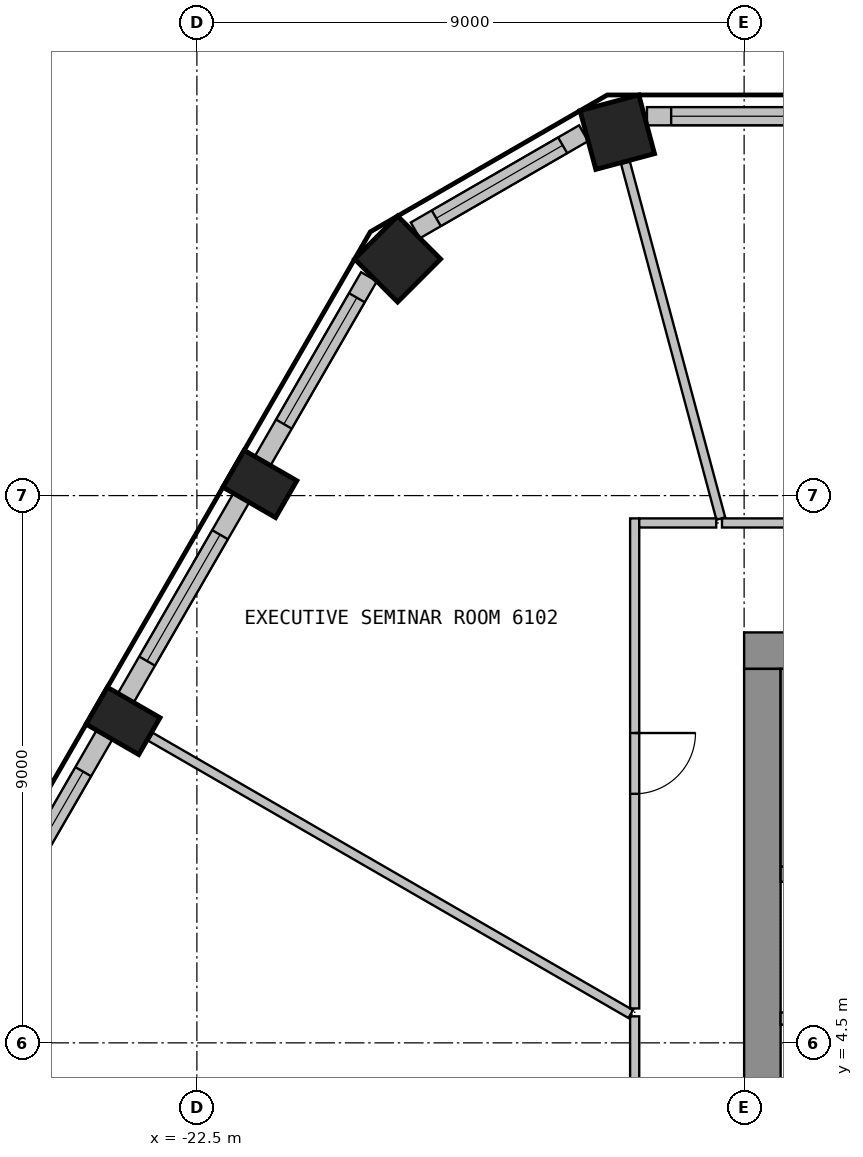
"""IFC4 building model, lengths in metres.
Left out: names, types, materials, properties, quantities, classifications, styles, units other than length and angle.
Written with IfcOpenShell. Run it as: python <this file> out.ifc"""

import sys

from ifc_helpers import new_model, si_unit, direction, frame, frame_2d, origin, origin_2d, place, context, subcontext, project, spatial, rectangle, extrude, element, fill, save


model = new_model("IFC4")
c1 = context("Model", 3, precision=1e-05, world=origin(), true_north=direction((0.0, 1.0)))
c2 = subcontext(c1, "Body", "Model", "MODEL_VIEW")
j1 = project(units=[si_unit("LENGTHUNIT", "METRE"), si_unit("PLANEANGLEUNIT", "RADIAN")], contexts=[c1])
p1 = place(None, origin())
s1 = spatial("IfcSite", under=j1, at=p1, CompositionType="ELEMENT")
p2 = place(p1, origin())
s2 = spatial("IfcBuilding", under=s1, at=p2, CompositionType="ELEMENT")
p3 = place(p2, frame((0.0, 0.0, 246.9)))
s3 = spatial("IfcBuildingStorey", under=s2, at=p3, CompositionType="ELEMENT", Elevation=246.9)
for number, where, z_axis, x_axis in (
    (1, (-15.586, 19.476, 0.0), (0.0, 0.0, 1.0), (-0.966, -0.259, 0.0)),
    (2, (-19.199, 17.39, 0.0), (0.0, 0.0, 1.0), (-0.707, -0.707, 0.0)),
):
    element("IfcColumn", number, at=place(p3, frame(where, z_axis=z_axis, x_axis=x_axis)), inside=s3, PredefinedType="COLUMN", context=c2, shape_type="SweptSolid", body=[
        extrude(rectangle(XDim=1.0, YDim=1.0, at=origin_2d()), origin(), (0.0, 0.0, 1.0), 3.575),
    ])
for number, where, z_axis, x_axis in (
    (3, (-21.464, 13.691, 0.0), (0.0, 0.0, 1.0), (-0.5, -0.866, 0.0)),
    (4, (-23.714, 9.794, 0.0), (0.0, 0.0, 1.0), (-0.5, -0.866, 0.0)),
):
    element("IfcColumn", number, at=place(p3, frame(where, z_axis=z_axis, x_axis=x_axis)), inside=s3, PredefinedType="COLUMN", context=c2, shape_type="SweptSolid", body=[
        extrude(rectangle(XDim=0.7, YDim=1.0, at=origin_2d()), origin(), (0.0, 0.0, 1.0), 3.575),
    ])
p4 = place(p3, frame((-11.601, 19.739, 0.0), z_axis=(0.0, 0.0, 1.0), x_axis=(-1.0, 0.0, 0.0)))
e5 = element("IfcWall", 5, at=p4, inside=s3, PredefinedType="SOLIDWALL", context=c2, shape_type="SweptSolid", body=[
    extrude(rectangle(XDim=3.498, YDim=0.3, at=frame_2d((1.749, 0.0))), origin(), (0.0, 0.0, 1.0), 3.575),
])
p5 = place(p4, frame((0.699, 0.0, 0.9)))
e6 = element("IfcOpeningElement", 6, at=p5, cuts=e5, PredefinedType="OPENING", context=c2, shape_type="SweptSolid", body=[
    extrude(rectangle(XDim=2.4, YDim=2.1, at=frame_2d((1.2, 1.05))), frame((0.0, 0.16, 0.0), z_axis=(0.0, -1.0, 0.0), x_axis=(1.0, 0.0, 0.0)), (0.0, 0.0, 1.0), 0.32),
])
p6 = place(p3, frame((-16.14, 19.459, 0.0), z_axis=(0.0, 0.0, 1.0), x_axis=(-0.866025316205, -0.500000151692, 0.0)))
e7 = element("IfcWall", 7, at=p6, inside=s3, PredefinedType="SOLIDWALL", context=c2, shape_type="SweptSolid", body=[
    extrude(rectangle(XDim=3.196, YDim=0.3, at=frame_2d((1.598, 0.0))), origin(), (0.0, 0.0, 1.0), 3.575),
])
p7 = place(p6, frame((0.398, 0.0, 0.9)))
e8 = element("IfcOpeningElement", 8, at=p7, cuts=e7, PredefinedType="OPENING", context=c2, shape_type="SweptSolid", body=[
    extrude(rectangle(XDim=2.4, YDim=2.1, at=frame_2d((1.2, 1.05))), frame((0.0, 0.16, 0.0), z_axis=(0.0, -1.0, 0.0), x_axis=(1.0, 0.0, 0.0)), (0.0, 0.0, 1.0), 0.32),
])
p8 = place(p3, frame((-19.67, 17.099, 0.0), z_axis=(0.0, 0.0, 1.0), x_axis=(-0.499960102815, -0.866048437209, 0.0)))
e9 = element("IfcWall", 9, at=p8, inside=s3, PredefinedType="SOLIDWALL", context=c2, shape_type="SweptSolid", body=[
    extrude(rectangle(XDim=3.498, YDim=0.3, at=frame_2d((1.749, 0.0))), origin(), (0.0, 0.0, 1.0), 3.575),
])
p9 = place(p8, frame((0.398, 0.0, 0.9)))
e10 = element("IfcOpeningElement", 10, at=p9, cuts=e9, PredefinedType="OPENING", context=c2, shape_type="SweptSolid", body=[
    extrude(rectangle(XDim=2.4, YDim=2.1, at=frame_2d((1.2, 1.05))), frame((0.0, 0.16, 0.0), z_axis=(0.0, -1.0, 0.0), x_axis=(1.0, 0.0, 0.0)), (0.0, 0.0, 1.0), 0.32),
])
p10 = place(p3, frame((-21.769, 13.463, 0.0), z_axis=(0.0, 0.0, 1.0), x_axis=(-0.499982058975, -0.866035761792, 0.0)))
e11 = element("IfcWall", 11, at=p10, inside=s3, PredefinedType="SOLIDWALL", context=c2, shape_type="SweptSolid", body=[
    extrude(rectangle(XDim=3.799, YDim=0.3, at=frame_2d((1.899, 0.0))), origin(), (0.0, 0.0, 1.0), 3.575),
])
p11 = place(p10, frame((0.699, 0.0, 0.9)))
e12 = element("IfcOpeningElement", 12, at=p11, cuts=e11, PredefinedType="OPENING", context=c2, shape_type="SweptSolid", body=[
    extrude(rectangle(XDim=2.4, YDim=2.1, at=frame_2d((1.2, 1.05))), frame((0.0, 0.16, 0.0), z_axis=(0.0, -1.0, 0.0), x_axis=(1.0, 0.0, 0.0)), (0.0, 0.0, 1.0), 0.32),
])
p12 = place(p3, frame((-24.019, 9.566, 0.0), z_axis=(0.0, 0.0, 1.0), x_axis=(-0.499982058975, -0.866035761792, 0.0)))
e13 = element("IfcWall", 13, at=p12, inside=s3, PredefinedType="SOLIDWALL", context=c2, shape_type="SweptSolid", body=[
    extrude(rectangle(XDim=3.799, YDim=0.3, at=frame_2d((1.899, 0.0))), origin(), (0.0, 0.0, 1.0), 3.575),
])
p13 = place(p12, frame((0.699, 0.0, 0.9)))
e14 = element("IfcOpeningElement", 14, at=p13, cuts=e13, PredefinedType="OPENING", context=c2, shape_type="SweptSolid", body=[
    extrude(rectangle(XDim=2.4, YDim=2.1, at=frame_2d((1.2, 1.05))), frame((0.0, 0.16, 0.0), z_axis=(0.0, -1.0, 0.0), x_axis=(1.0, 0.0, 0.0)), (0.0, 0.0, 1.0), 0.32),
])
p14 = place(p3, frame((-13.5, 10.95, 0.0), z_axis=(0.0, 0.0, 1.0), x_axis=(1.0, 0.0, 0.0)))
e15 = element("IfcWall", 15, at=p14, inside=s3, PredefinedType="SHEAR", context=c2, shape_type="SweptSolid", body=[
    extrude(rectangle(XDim=27.0, YDim=0.6, at=frame_2d((13.5, 0.0))), origin(), (0.0, 0.0, 1.0), 3.575),
])
p15 = place(p14, frame((12.3, 0.0, 0.0)))
e16 = element("IfcOpeningElement", 16, at=p15, cuts=e15, PredefinedType="OPENING", context=c2, shape_type="SweptSolid", body=[
    extrude(rectangle(XDim=2.4, YDim=2.1, at=frame_2d((1.2, 1.05))), frame((0.0, 0.31, 0.0), z_axis=(0.0, -1.0, 0.0), x_axis=(1.0, 0.0, 0.0)), (0.0, 0.0, 1.0), 0.62),
])
p16 = place(p14, frame((1.05, 0.0, 0.0)))
e17 = element("IfcOpeningElement", 17, at=p16, cuts=e15, PredefinedType="OPENING", context=c2, shape_type="SweptSolid", body=[
    extrude(rectangle(XDim=1.2, YDim=2.1, at=frame_2d((0.6, 1.05))), frame((0.0, 0.31, 0.0), z_axis=(0.0, -1.0, 0.0), x_axis=(1.0, 0.0, 0.0)), (0.0, 0.0, 1.0), 0.62),
])
p17 = place(p14, frame((24.75, 0.0, 0.0)))
e18 = element("IfcOpeningElement", 18, at=p17, cuts=e15, PredefinedType="OPENING", context=c2, shape_type="SweptSolid", body=[
    extrude(rectangle(XDim=1.2, YDim=2.1, at=frame_2d((0.6, 1.05))), frame((0.0, 0.31, 0.0), z_axis=(0.0, -1.0, 0.0), x_axis=(1.0, 0.0, 0.0)), (0.0, 0.0, 1.0), 0.62),
])
p18 = place(p3, frame((-13.2, -10.65, 0.0), z_axis=(0.0, 0.0, 1.0), x_axis=(0.0, 1.0, 0.0)))
e19 = element("IfcWall", 19, at=p18, inside=s3, PredefinedType="SHEAR", context=c2, shape_type="SweptSolid", body=[
    extrude(rectangle(XDim=21.3, YDim=0.6, at=frame_2d((10.65, 0.0))), origin(), (0.0, 0.0, 1.0), 3.575),
])
p19 = place(p18, frame((9.45, 0.0, 0.0)))
e20 = element("IfcOpeningElement", 20, at=p19, cuts=e19, PredefinedType="OPENING", context=c2, shape_type="SweptSolid", body=[
    extrude(rectangle(XDim=2.4, YDim=2.1, at=frame_2d((1.2, 1.05))), frame((0.0, 0.31, 0.0), z_axis=(0.0, -1.0, 0.0), x_axis=(1.0, 0.0, 0.0)), (0.0, 0.0, 1.0), 0.62),
])
p20 = place(p3, frame((-12.9, 7.275, 0.0), z_axis=(0.0, 0.0, 1.0), x_axis=(1.0, 0.0, 0.0)))
e21 = element("IfcWall", 21, at=p20, inside=s3, PredefinedType="SHEAR", context=c2, shape_type="SweptSolid", body=[
    extrude(rectangle(XDim=10.1, YDim=0.25, at=frame_2d((5.05, 0.0))), origin(), (0.0, 0.0, 1.0), 3.575),
])
p21 = place(p20, frame((0.45, 0.0, 0.0)))
e22 = element("IfcOpeningElement", 22, at=p21, cuts=e21, PredefinedType="OPENING", context=c2, shape_type="SweptSolid", body=[
    extrude(rectangle(XDim=1.2, YDim=2.1, at=frame_2d((0.6, 1.05))), frame((0.0, 0.135, 0.0), z_axis=(0.0, -1.0, 0.0), x_axis=(1.0, 0.0, 0.0)), (0.0, 0.0, 1.0), 0.27),
])
p22 = place(p3, frame((-12.775, 7.4, 0.0), z_axis=(0.0, 0.0, 1.0), x_axis=(0.0, 1.0, 0.0)))
e23 = element("IfcWall", 23, at=p22, inside=s3, PredefinedType="SHEAR", context=c2, shape_type="SweptSolid", body=[
    extrude(rectangle(XDim=3.25, YDim=0.25, at=frame_2d((1.625, 0.0))), origin(), (0.0, 0.0, 1.0), 3.575),
])
p23 = place(p3, frame((-12.9, 4.9, 0.0), z_axis=(0.0, 0.0, 1.0), x_axis=(1.0, 0.0, 0.0)))
e24 = element("IfcWall", 24, at=p23, inside=s3, PredefinedType="PARTITIONING", context=c2, shape_type="SweptSolid", body=[
    extrude(rectangle(XDim=11.375, YDim=0.2, at=frame_2d((5.688, 0.0))), origin(), (0.0, 0.0, 1.0), 3.575),
])
p24 = place(p3, frame((-23.264, 9.534, 0.0), z_axis=(0.0, 0.0, 1.0), x_axis=(0.866009068046, -0.500028293261, 0.0)))
e25 = element("IfcWall", 25, at=p24, inside=s3, PredefinedType="PARTITIONING", context=c2, shape_type="SweptSolid", body=[
    extrude(rectangle(XDim=9.121, YDim=0.15, at=frame_2d((4.561, 0.0))), origin(), (0.0, 0.0, 1.0), 3.575),
])
p25 = place(p3, frame((-15.452, 18.974, 0.0), z_axis=(0.0, 0.0, 1.0), x_axis=(0.258896568031, -0.965905050749, 0.0)))
e26 = element("IfcWall", 26, at=p25, inside=s3, PredefinedType="PARTITIONING", context=c2, shape_type="SweptSolid", body=[
    extrude(rectangle(XDim=6.058, YDim=0.15, at=frame_2d((3.029, 0.0))), origin(), (0.0, 0.0, 1.0), 3.575),
])
p26 = place(p3, frame((-15.3, 4.936, 0.0), z_axis=(0.0, 0.0, 1.0), x_axis=(0.0, -1.0, 0.0)))
e27 = element("IfcWall", 27, at=p26, inside=s3, PredefinedType="PARTITIONING", context=c2, shape_type="SweptSolid", body=[
    extrude(rectangle(XDim=6.167, YDim=0.15, at=frame_2d((3.083, 0.0))), origin(), (0.0, 0.0, 1.0), 3.575),
])
p27 = place(p26, frame((2.583, 0.0, 0.0)))
e28 = element("IfcOpeningElement", 28, at=p27, cuts=e27, PredefinedType="OPENING", context=c2, shape_type="SweptSolid", body=[
    extrude(rectangle(XDim=1.0, YDim=2.1, at=frame_2d((0.5, 1.05))), frame((0.0, 0.085, 0.0), z_axis=(0.0, -1.0, 0.0), x_axis=(1.0, 0.0, 0.0)), (0.0, 0.0, 1.0), 0.17),
])
p28 = place(p3, frame((-15.3, 13.125, 0.0), z_axis=(0.0, 0.0, 1.0), x_axis=(0.0, -1.0, 0.0)))
e29 = element("IfcWall", 29, at=p28, inside=s3, PredefinedType="PARTITIONING", context=c2, shape_type="SweptSolid", body=[
    extrude(rectangle(XDim=8.059, YDim=0.15, at=frame_2d((4.03, 0.0))), origin(), (0.0, 0.0, 1.0), 3.575),
])
p29 = place(p28, frame((3.53, 0.0, 0.0)))
e30 = element("IfcOpeningElement", 30, at=p29, cuts=e29, PredefinedType="OPENING", context=c2, shape_type="SweptSolid", body=[
    extrude(rectangle(XDim=1.0, YDim=2.1, at=frame_2d((0.5, 1.05))), frame((0.0, 0.085, 0.0), z_axis=(0.0, -1.0, 0.0), x_axis=(1.0, 0.0, 0.0)), (0.0, 0.0, 1.0), 0.17),
])
p30 = place(p3, frame((-13.959, 13.05, 0.0), z_axis=(0.0, 0.0, 1.0), x_axis=(-1.0, 0.0, 0.0)))
e31 = element("IfcWall", 31, at=p30, inside=s3, PredefinedType="PARTITIONING", context=c2, shape_type="SweptSolid", body=[
    extrude(rectangle(XDim=1.266, YDim=0.15, at=frame_2d((0.633, 0.0))), origin(), (0.0, 0.0, 1.0), 3.575),
])
p31 = place(p3, frame((-6.75, 13.05, 0.0), z_axis=(0.0, 0.0, 1.0), x_axis=(-1.0, 0.0, 0.0)))
e32 = element("IfcWall", 32, at=p31, inside=s3, PredefinedType="PARTITIONING", context=c2, shape_type="SweptSolid", body=[
    extrude(rectangle(XDim=7.114, YDim=0.15, at=frame_2d((3.557, 0.0))), origin(), (0.0, 0.0, 1.0), 3.575),
])
p32 = place(p31, frame((3.057, 0.0, 0.0)))
e33 = element("IfcOpeningElement", 33, at=p32, cuts=e32, PredefinedType="OPENING", context=c2, shape_type="SweptSolid", body=[
    extrude(rectangle(XDim=1.0, YDim=2.1, at=frame_2d((0.5, 1.05))), frame((0.0, 0.085, 0.0), z_axis=(0.0, -1.0, 0.0), x_axis=(1.0, 0.0, 0.0)), (0.0, 0.0, 1.0), 0.17),
])
p33 = place(p5, origin())
e34 = element("IfcWindow", 34, at=p33, inside=s3, PartitioningType="SINGLE_PANEL", PredefinedType="WINDOW", context=c2, shape_type="SweptSolid", body=[
    extrude(rectangle(XDim=2.4, YDim=2.1, at=frame_2d((1.2, 1.05))), frame((0.0, 0.03, 0.0), z_axis=(0.0, -1.0, 0.0), x_axis=(1.0, 0.0, 0.0)), (0.0, 0.0, 1.0), 0.06),
])
fill(e6, e34)
p34 = place(p7, origin())
e35 = element("IfcWindow", 35, at=p34, inside=s3, PartitioningType="SINGLE_PANEL", PredefinedType="WINDOW", context=c2, shape_type="SweptSolid", body=[
    extrude(rectangle(XDim=2.4, YDim=2.1, at=frame_2d((1.2, 1.05))), frame((0.0, 0.03, 0.0), z_axis=(0.0, -1.0, 0.0), x_axis=(1.0, 0.0, 0.0)), (0.0, 0.0, 1.0), 0.06),
])
fill(e8, e35)
p35 = place(p9, origin())
e36 = element("IfcWindow", 36, at=p35, inside=s3, PartitioningType="SINGLE_PANEL", PredefinedType="WINDOW", context=c2, shape_type="SweptSolid", body=[
    extrude(rectangle(XDim=2.4, YDim=2.1, at=frame_2d((1.2, 1.05))), frame((0.0, 0.03, 0.0), z_axis=(0.0, -1.0, 0.0), x_axis=(1.0, 0.0, 0.0)), (0.0, 0.0, 1.0), 0.06),
])
fill(e10, e36)
p36 = place(p11, origin())
e37 = element("IfcWindow", 37, at=p36, inside=s3, PartitioningType="SINGLE_PANEL", PredefinedType="WINDOW", context=c2, shape_type="SweptSolid", body=[
    extrude(rectangle(XDim=2.4, YDim=2.1, at=frame_2d((1.2, 1.05))), frame((0.0, 0.03, 0.0), z_axis=(0.0, -1.0, 0.0), x_axis=(1.0, 0.0, 0.0)), (0.0, 0.0, 1.0), 0.06),
])
fill(e12, e37)
p37 = place(p13, origin())
e38 = element("IfcWindow", 38, at=p37, inside=s3, PartitioningType="SINGLE_PANEL", PredefinedType="WINDOW", context=c2, shape_type="SweptSolid", body=[
    extrude(rectangle(XDim=2.4, YDim=2.1, at=frame_2d((1.2, 1.05))), frame((0.0, 0.03, 0.0), z_axis=(0.0, -1.0, 0.0), x_axis=(1.0, 0.0, 0.0)), (0.0, 0.0, 1.0), 0.06),
])
fill(e14, e38)
p38 = place(p29, origin())
e39 = element("IfcDoor", 39, at=p38, inside=s3, OperationType="SINGLE_SWING_LEFT", PredefinedType="DOOR", context=c2, shape_type="SweptSolid", body=[
    extrude(rectangle(XDim=1.0, YDim=2.1, at=frame_2d((0.5, 1.05))), frame((0.0, 0.025, 0.0), z_axis=(0.0, -1.0, 0.0), x_axis=(1.0, 0.0, 0.0)), (0.0, 0.0, 1.0), 0.05),
])
fill(e30, e39)
save(model, sys.argv[1])
